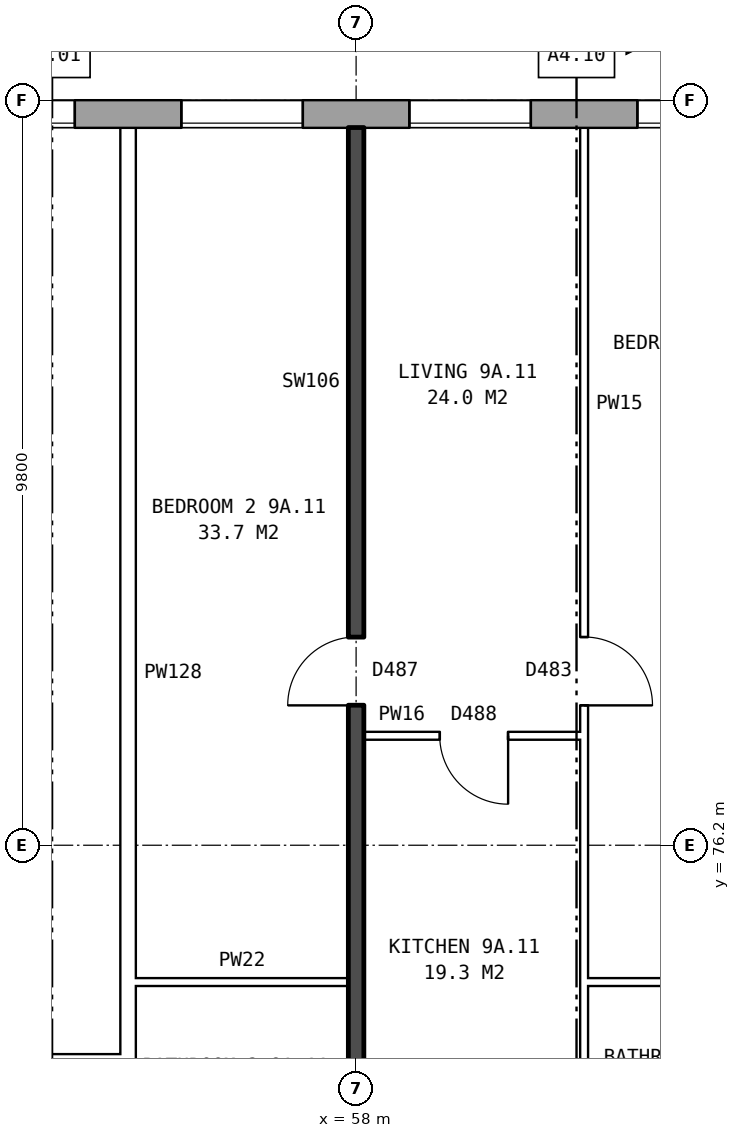
"""IFC4 building model, lengths in metres.
Left out: names, types, materials, properties, quantities, classifications, styles, units other than length and angle.
Written with IfcOpenShell. Run it as: python <this file> out.ifc"""

import sys

from ifc_helpers import new_model, si_unit, direction, frame, frame_2d, origin, place, context, subcontext, project, spatial, rectangle, extrude, element, fill, save


model = new_model("IFC4")
c1 = context("Model", 3, precision=1e-05, world=origin(), true_north=direction((0.0, 1.0)))
c2 = subcontext(c1, "Body", "Model", "MODEL_VIEW")
j1 = project(units=[si_unit("LENGTHUNIT", "METRE"), si_unit("PLANEANGLEUNIT", "RADIAN")], contexts=[c1])
p1 = place(None, origin())
s1 = spatial("IfcSite", under=j1, at=p1, CompositionType="ELEMENT")
p2 = place(p1, origin())
s2 = spatial("IfcBuilding", under=s1, at=p2, CompositionType="ELEMENT")
p3 = place(p2, frame((0.0, 0.0, 35.0)))
s3 = spatial("IfcBuildingStorey", under=s2, at=p3, CompositionType="ELEMENT", Elevation=35.0)
p4 = place(p3, frame((72.925, 85.82, 0.0), z_axis=(0.0, 0.0, 1.0), x_axis=(-1.0, 0.0, 0.0)))
e1 = element("IfcWall", 1, at=p4, inside=s3, PredefinedType="STANDARD", context=c2, shape_type="SweptSolid", body=[
    extrude(rectangle(XDim=50.101, YDim=0.36, at=frame_2d((25.05, 0.0))), origin(), (0.0, 0.0, 1.0), 2.85),
])
p5 = place(p4, frame((0.625, 0.0, 0.8)))
e2 = element("IfcOpeningElement", 2, at=p5, cuts=e1, PredefinedType="OPENING", context=c2, shape_type="SweptSolid", body=[
    extrude(rectangle(XDim=1.6, YDim=1.8, at=frame_2d((0.8, 0.9))), frame((0.0, 0.19, 0.0), z_axis=(0.0, -1.0, 0.0), x_axis=(1.0, 0.0, 0.0)), (0.0, 0.0, 1.0), 0.38),
])
p6 = place(p4, frame((3.625, 0.0, 0.8)))
e3 = element("IfcOpeningElement", 3, at=p6, cuts=e1, PredefinedType="OPENING", context=c2, shape_type="SweptSolid", body=[
    extrude(rectangle(XDim=1.6, YDim=1.8, at=frame_2d((0.8, 0.9))), frame((0.0, 0.19, 0.0), z_axis=(0.0, -1.0, 0.0), x_axis=(1.0, 0.0, 0.0)), (0.0, 0.0, 1.0), 0.38),
])
p7 = place(p4, frame((6.625, 0.0, 0.8)))
e4 = element("IfcOpeningElement", 4, at=p7, cuts=e1, PredefinedType="OPENING", context=c2, shape_type="SweptSolid", body=[
    extrude(rectangle(XDim=1.6, YDim=1.8, at=frame_2d((0.8, 0.9))), frame((0.0, 0.19, 0.0), z_axis=(0.0, -1.0, 0.0), x_axis=(1.0, 0.0, 0.0)), (0.0, 0.0, 1.0), 0.38),
])
p8 = place(p4, frame((9.625, 0.0, 0.8)))
e5 = element("IfcOpeningElement", 5, at=p8, cuts=e1, PredefinedType="OPENING", context=c2, shape_type="SweptSolid", body=[
    extrude(rectangle(XDim=1.6, YDim=1.8, at=frame_2d((0.8, 0.9))), frame((0.0, 0.19, 0.0), z_axis=(0.0, -1.0, 0.0), x_axis=(1.0, 0.0, 0.0)), (0.0, 0.0, 1.0), 0.38),
])
p9 = place(p4, frame((12.625, 0.0, 0.8)))
e6 = element("IfcOpeningElement", 6, at=p9, cuts=e1, PredefinedType="OPENING", context=c2, shape_type="SweptSolid", body=[
    extrude(rectangle(XDim=1.6, YDim=1.8, at=frame_2d((0.8, 0.9))), frame((0.0, 0.19, 0.0), z_axis=(0.0, -1.0, 0.0), x_axis=(1.0, 0.0, 0.0)), (0.0, 0.0, 1.0), 0.38),
])
p10 = place(p4, frame((15.625, 0.0, 0.8)))
e7 = element("IfcOpeningElement", 7, at=p10, cuts=e1, PredefinedType="OPENING", context=c2, shape_type="SweptSolid", body=[
    extrude(rectangle(XDim=1.6, YDim=1.8, at=frame_2d((0.8, 0.9))), frame((0.0, 0.19, 0.0), z_axis=(0.0, -1.0, 0.0), x_axis=(1.0, 0.0, 0.0)), (0.0, 0.0, 1.0), 0.38),
])
p11 = place(p4, frame((18.625, 0.0, 0.8)))
e8 = element("IfcOpeningElement", 8, at=p11, cuts=e1, PredefinedType="OPENING", context=c2, shape_type="SweptSolid", body=[
    extrude(rectangle(XDim=1.6, YDim=1.8, at=frame_2d((0.8, 0.9))), frame((0.0, 0.19, 0.0), z_axis=(0.0, -1.0, 0.0), x_axis=(1.0, 0.0, 0.0)), (0.0, 0.0, 1.0), 0.38),
])
p12 = place(p4, frame((21.125, 0.0, 1.1)))
e9 = element("IfcOpeningElement", 9, at=p12, cuts=e1, PredefinedType="OPENING", context=c2, shape_type="SweptSolid", body=[
    extrude(rectangle(XDim=0.8, YDim=1.5, at=frame_2d((0.4, 0.75))), frame((0.0, 0.19, 0.0), z_axis=(0.0, -1.0, 0.0), x_axis=(1.0, 0.0, 0.0)), (0.0, 0.0, 1.0), 0.38),
])
p13 = place(p4, frame((24.175, 0.0, 0.15)))
e10 = element("IfcOpeningElement", 10, at=p13, cuts=e1, PredefinedType="OPENING", context=c2, shape_type="SweptSolid", body=[
    extrude(rectangle(XDim=1.6, YDim=1.5, at=frame_2d((0.8, 0.75))), frame((0.0, 0.19, 0.0), z_axis=(0.0, -1.0, 0.0), x_axis=(1.0, 0.0, 0.0)), (0.0, 0.0, 1.0), 0.38),
])
p14 = place(p4, frame((27.275, 0.0, 1.7)))
e11 = element("IfcOpeningElement", 11, at=p14, cuts=e1, PredefinedType="OPENING", context=c2, shape_type="SweptSolid", body=[
    extrude(rectangle(XDim=1.2, YDim=0.9, at=frame_2d((0.6, 0.45))), frame((0.0, 0.19, 0.0), z_axis=(0.0, -1.0, 0.0), x_axis=(1.0, 0.0, 0.0)), (0.0, 0.0, 1.0), 0.38),
])
p15 = place(p4, frame((30.625, 0.0, 0.8)))
e12 = element("IfcOpeningElement", 12, at=p15, cuts=e1, PredefinedType="OPENING", context=c2, shape_type="SweptSolid", body=[
    extrude(rectangle(XDim=1.6, YDim=1.8, at=frame_2d((0.8, 0.9))), frame((0.0, 0.19, 0.0), z_axis=(0.0, -1.0, 0.0), x_axis=(1.0, 0.0, 0.0)), (0.0, 0.0, 1.0), 0.38),
])
p16 = place(p4, frame((33.625, 0.0, 0.8)))
e13 = element("IfcOpeningElement", 13, at=p16, cuts=e1, PredefinedType="OPENING", context=c2, shape_type="SweptSolid", body=[
    extrude(rectangle(XDim=1.6, YDim=1.8, at=frame_2d((0.8, 0.9))), frame((0.0, 0.19, 0.0), z_axis=(0.0, -1.0, 0.0), x_axis=(1.0, 0.0, 0.0)), (0.0, 0.0, 1.0), 0.38),
])
p17 = place(p4, frame((36.625, 0.0, 0.8)))
e14 = element("IfcOpeningElement", 14, at=p17, cuts=e1, PredefinedType="OPENING", context=c2, shape_type="SweptSolid", body=[
    extrude(rectangle(XDim=1.6, YDim=1.8, at=frame_2d((0.8, 0.9))), frame((0.0, 0.19, 0.0), z_axis=(0.0, -1.0, 0.0), x_axis=(1.0, 0.0, 0.0)), (0.0, 0.0, 1.0), 0.38),
])
p18 = place(p4, frame((39.625, 0.0, 0.8)))
e15 = element("IfcOpeningElement", 15, at=p18, cuts=e1, PredefinedType="OPENING", context=c2, shape_type="SweptSolid", body=[
    extrude(rectangle(XDim=1.6, YDim=1.8, at=frame_2d((0.8, 0.9))), frame((0.0, 0.19, 0.0), z_axis=(0.0, -1.0, 0.0), x_axis=(1.0, 0.0, 0.0)), (0.0, 0.0, 1.0), 0.38),
])
p19 = place(p4, frame((42.625, 0.0, 0.8)))
e16 = element("IfcOpeningElement", 16, at=p19, cuts=e1, PredefinedType="OPENING", context=c2, shape_type="SweptSolid", body=[
    extrude(rectangle(XDim=1.6, YDim=1.8, at=frame_2d((0.8, 0.9))), frame((0.0, 0.19, 0.0), z_axis=(0.0, -1.0, 0.0), x_axis=(1.0, 0.0, 0.0)), (0.0, 0.0, 1.0), 0.38),
])
p20 = place(p4, frame((45.625, 0.0, 0.8)))
e17 = element("IfcOpeningElement", 17, at=p20, cuts=e1, PredefinedType="OPENING", context=c2, shape_type="SweptSolid", body=[
    extrude(rectangle(XDim=1.6, YDim=1.8, at=frame_2d((0.8, 0.9))), frame((0.0, 0.19, 0.0), z_axis=(0.0, -1.0, 0.0), x_axis=(1.0, 0.0, 0.0)), (0.0, 0.0, 1.0), 0.38),
])
p21 = place(p4, frame((22.225, 0.0, 1.7)))
e18 = element("IfcOpeningElement", 18, at=p21, cuts=e1, PredefinedType="OPENING", context=c2, shape_type="SweptSolid", body=[
    extrude(rectangle(XDim=0.6, YDim=0.9, at=frame_2d((0.3, 0.45))), frame((0.0, 0.19, 0.0), z_axis=(0.0, -1.0, 0.0), x_axis=(1.0, 0.0, 0.0)), (0.0, 0.0, 1.0), 0.38),
])
p22 = place(p4, frame((26.075, 0.0, 0.25)))
e19 = element("IfcOpeningElement", 19, at=p22, cuts=e1, PredefinedType="OPENING", context=c2, shape_type="SweptSolid", body=[
    extrude(rectangle(XDim=0.6, YDim=0.9, at=frame_2d((0.3, 0.45))), frame((0.0, 0.19, 0.0), z_axis=(0.0, -1.0, 0.0), x_axis=(1.0, 0.0, 0.0)), (0.0, 0.0, 1.0), 0.38),
])
p23 = place(p4, frame((28.775, 0.0, 0.8)))
e20 = element("IfcOpeningElement", 20, at=p23, cuts=e1, PredefinedType="OPENING", context=c2, shape_type="SweptSolid", body=[
    extrude(rectangle(XDim=1.4, YDim=1.8, at=frame_2d((0.7, 0.9))), frame((0.0, 0.19, 0.0), z_axis=(0.0, -1.0, 0.0), x_axis=(1.0, 0.0, 0.0)), (0.0, 0.0, 1.0), 0.38),
])
for number, where, z_axis, x_axis in (
    (21, (52.1, 73.4, 0.0), (0.0, 0.0, 1.0), (1.0, 0.0, 0.0)),
    (22, (55.1, 74.4, 0.0), (0.0, 0.0, 1.0), (1.0, 0.0, 0.0)),
):
    element("IfcWall", number, at=place(p3, frame(where, z_axis=z_axis, x_axis=x_axis)), inside=s3, PredefinedType="PARTITIONING", context=c2, shape_type="SweptSolid", body=[
        extrude(rectangle(XDim=2.8, YDim=0.1, at=frame_2d((1.4, 0.0))), origin(), (0.0, 0.0, 1.0), 2.85),
    ])
p24 = place(p3, frame((61.0, 74.4, 0.0), z_axis=(0.0, 0.0, 1.0), x_axis=(1.0, 0.0, 0.0)))
e23 = element("IfcWall", 23, at=p24, inside=s3, PredefinedType="PARTITIONING", context=c2, shape_type="SweptSolid", body=[
    extrude(rectangle(XDim=2.64, YDim=0.1, at=frame_2d((1.32, 0.0))), origin(), (0.0, 0.0, 1.0), 2.85),
])
p25 = place(p3, frame((58.1, 77.64, 0.0), z_axis=(0.0, 0.0, 1.0), x_axis=(1.0, 0.0, 0.0)))
e24 = element("IfcWall", 24, at=p25, inside=s3, PredefinedType="PARTITIONING", context=c2, shape_type="SweptSolid", body=[
    extrude(rectangle(XDim=2.9, YDim=0.1, at=frame_2d((1.45, 0.0))), origin(), (0.0, 0.0, 1.0), 2.85),
])
p26 = place(p25, frame((1.0, 0.0, 0.0)))
e25 = element("IfcOpeningElement", 25, at=p26, cuts=e24, PredefinedType="OPENING", context=c2, shape_type="SweptSolid", body=[
    extrude(rectangle(XDim=0.9, YDim=2.1, at=frame_2d((0.45, 1.05))), frame((0.0, 0.06, 0.0), z_axis=(0.0, -1.0, 0.0), x_axis=(1.0, 0.0, 0.0)), (0.0, 0.0, 1.0), 0.12),
])
p27 = place(p3, frame((55.0, 71.3, 0.0), z_axis=(0.0, 0.0, 1.0), x_axis=(0.0, 1.0, 0.0)))
e26 = element("IfcWall", 26, at=p27, inside=s3, PredefinedType="PARTITIONING", context=c2, shape_type="SweptSolid", body=[
    extrude(rectangle(XDim=14.34, YDim=0.2, at=frame_2d((7.17, 0.0))), origin(), (0.0, 0.0, 1.0), 2.85),
])
p28 = place(p3, frame((58.0, 71.2, 0.0), z_axis=(0.0, 0.0, 1.0), x_axis=(0.0, 1.0, 0.0)))
e27 = element("IfcWall", 27, at=p28, inside=s3, PredefinedType="SOLIDWALL", context=c2, shape_type="SweptSolid", body=[
    extrude(rectangle(XDim=14.44, YDim=0.2, at=frame_2d((7.22, 0.0))), origin(), (0.0, 0.0, 1.0), 2.85),
])
p29 = place(p28, frame((6.84, 0.0, 0.0)))
e28 = element("IfcOpeningElement", 28, at=p29, cuts=e27, PredefinedType="OPENING", context=c2, shape_type="SweptSolid", body=[
    extrude(rectangle(XDim=0.9, YDim=2.1, at=frame_2d((0.45, 1.05))), frame((0.0, 0.11, 0.0), z_axis=(0.0, -1.0, 0.0), x_axis=(1.0, 0.0, 0.0)), (0.0, 0.0, 1.0), 0.22),
])
p30 = place(p28, frame((0.4, 0.0, 0.0)))
e29 = element("IfcOpeningElement", 29, at=p30, cuts=e27, PredefinedType="OPENING", context=c2, shape_type="SweptSolid", body=[
    extrude(rectangle(XDim=0.9, YDim=2.1, at=frame_2d((0.45, 1.05))), frame((0.0, 0.11, 0.0), z_axis=(0.0, -1.0, 0.0), x_axis=(1.0, 0.0, 0.0)), (0.0, 0.0, 1.0), 0.22),
])
p31 = place(p3, frame((61.0, 71.3, 0.0), z_axis=(0.0, 0.0, 1.0), x_axis=(0.0, 1.0, 0.0)))
e30 = element("IfcWall", 30, at=p31, inside=s3, PredefinedType="PARTITIONING", context=c2, shape_type="SweptSolid", body=[
    extrude(rectangle(XDim=14.34, YDim=0.1, at=frame_2d((7.17, 0.0))), origin(), (0.0, 0.0, 1.0), 2.85),
])
p32 = place(p31, frame((6.74, 0.0, 0.0)))
e31 = element("IfcOpeningElement", 31, at=p32, cuts=e30, PredefinedType="OPENING", context=c2, shape_type="SweptSolid", body=[
    extrude(rectangle(XDim=0.9, YDim=2.1, at=frame_2d((0.45, 1.05))), frame((0.0, 0.06, 0.0), z_axis=(0.0, -1.0, 0.0), x_axis=(1.0, 0.0, 0.0)), (0.0, 0.0, 1.0), 0.12),
])
p33 = place(p31, frame((0.4, 0.0, 0.0)))
e32 = element("IfcOpeningElement", 32, at=p33, cuts=e30, PredefinedType="OPENING", context=c2, shape_type="SweptSolid", body=[
    extrude(rectangle(XDim=0.9, YDim=2.1, at=frame_2d((0.45, 1.05))), frame((0.0, 0.06, 0.0), z_axis=(0.0, -1.0, 0.0), x_axis=(1.0, 0.0, 0.0)), (0.0, 0.0, 1.0), 0.12),
])
p34 = place(p8, origin())
e33 = element("IfcWindow", 33, at=p34, inside=s3, PartitioningType="SINGLE_PANEL", PredefinedType="WINDOW", context=c2, shape_type="SweptSolid", body=[
    extrude(rectangle(XDim=1.6, YDim=1.8, at=frame_2d((0.8, 0.9))), frame((0.0, 0.15, 0.0), z_axis=(0.0, -1.0, 0.0), x_axis=(1.0, 0.0, 0.0)), (0.0, 0.0, 1.0), 0.06),
])
fill(e5, e33)
p35 = place(p9, origin())
e34 = element("IfcWindow", 34, at=p35, inside=s3, PartitioningType="SINGLE_PANEL", PredefinedType="WINDOW", context=c2, shape_type="SweptSolid", body=[
    extrude(rectangle(XDim=1.6, YDim=1.8, at=frame_2d((0.8, 0.9))), frame((0.0, 0.15, 0.0), z_axis=(0.0, -1.0, 0.0), x_axis=(1.0, 0.0, 0.0)), (0.0, 0.0, 1.0), 0.06),
])
fill(e6, e34)
p36 = place(p10, origin())
e35 = element("IfcWindow", 35, at=p36, inside=s3, PartitioningType="SINGLE_PANEL", PredefinedType="WINDOW", context=c2, shape_type="SweptSolid", body=[
    extrude(rectangle(XDim=1.6, YDim=1.8, at=frame_2d((0.8, 0.9))), frame((0.0, 0.15, 0.0), z_axis=(0.0, -1.0, 0.0), x_axis=(1.0, 0.0, 0.0)), (0.0, 0.0, 1.0), 0.06),
])
fill(e7, e35)
p37 = place(p11, origin())
e36 = element("IfcWindow", 36, at=p37, inside=s3, PartitioningType="SINGLE_PANEL", PredefinedType="WINDOW", context=c2, shape_type="SweptSolid", body=[
    extrude(rectangle(XDim=1.6, YDim=1.8, at=frame_2d((0.8, 0.9))), frame((0.0, 0.15, 0.0), z_axis=(0.0, -1.0, 0.0), x_axis=(1.0, 0.0, 0.0)), (0.0, 0.0, 1.0), 0.06),
])
fill(e8, e36)
p38 = place(p32, frame((0.9, 0.0, 0.0), z_axis=(0.0, 0.0, 1.0), x_axis=(-1.0, 0.0, 0.0)))
e37 = element("IfcDoor", 37, at=p38, inside=s3, OperationType="SINGLE_SWING_RIGHT", PredefinedType="DOOR", context=c2, shape_type="SweptSolid", body=[
    extrude(rectangle(XDim=0.9, YDim=2.1, at=frame_2d((0.45, 1.05))), frame((0.0, 0.025, 0.0), z_axis=(0.0, -1.0, 0.0), x_axis=(1.0, 0.0, 0.0)), (0.0, 0.0, 1.0), 0.05),
])
fill(e31, e37)
p39 = place(p29, origin())
e38 = element("IfcDoor", 38, at=p39, inside=s3, OperationType="SINGLE_SWING_LEFT", PredefinedType="DOOR", context=c2, shape_type="SweptSolid", body=[
    extrude(rectangle(XDim=0.9, YDim=2.1, at=frame_2d((0.45, 1.05))), frame((0.0, 0.025, 0.0), z_axis=(0.0, -1.0, 0.0), x_axis=(1.0, 0.0, 0.0)), (0.0, 0.0, 1.0), 0.05),
])
fill(e28, e38)
p40 = place(p26, frame((0.9, 0.0, 0.0), z_axis=(0.0, 0.0, 1.0), x_axis=(-1.0, 0.0, 0.0)))
e39 = element("IfcDoor", 39, at=p40, inside=s3, OperationType="SINGLE_SWING_LEFT", PredefinedType="DOOR", context=c2, shape_type="SweptSolid", body=[
    extrude(rectangle(XDim=0.9, YDim=2.1, at=frame_2d((0.45, 1.05))), frame((0.0, 0.025, 0.0), z_axis=(0.0, -1.0, 0.0), x_axis=(1.0, 0.0, 0.0)), (0.0, 0.0, 1.0), 0.05),
])
fill(e25, e39)
save(model, sys.argv[1])
